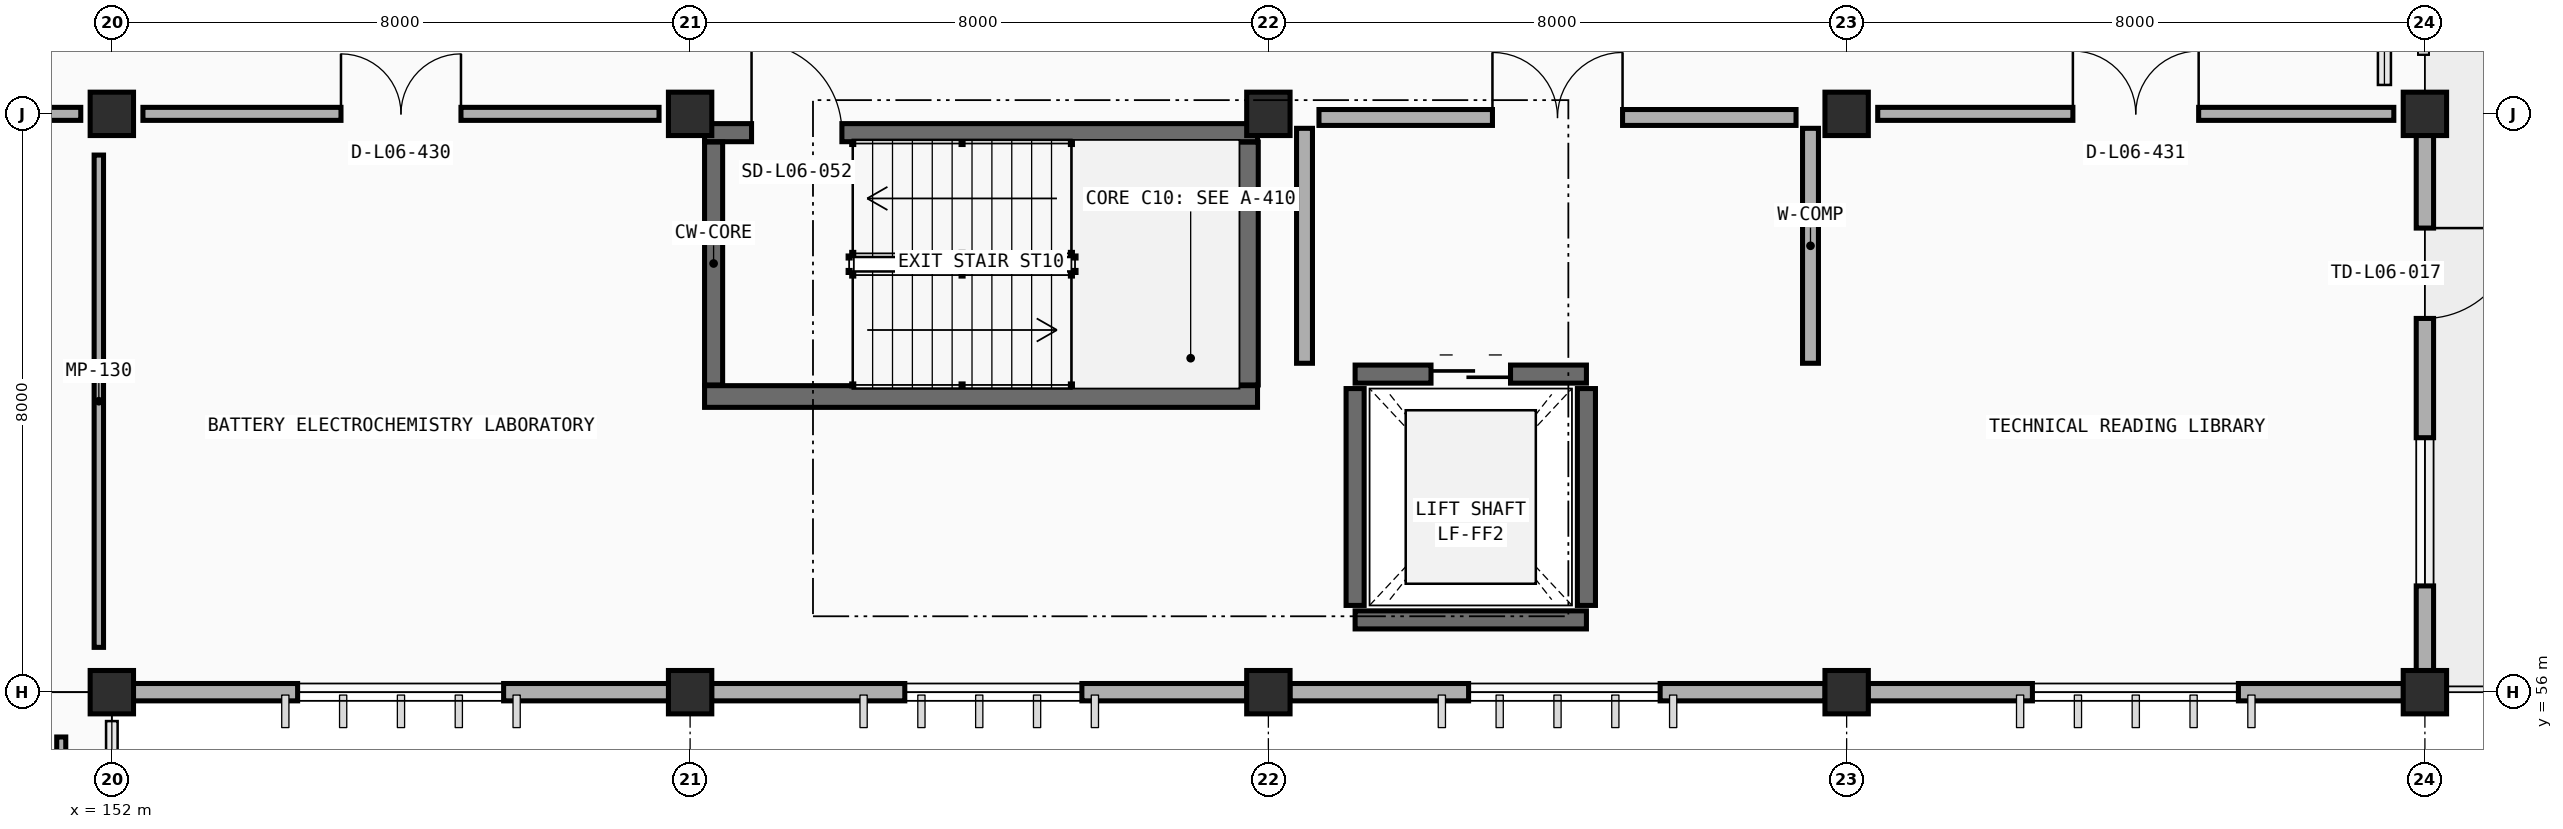
"""IFC4 building model, lengths in metres.
Left out: names, types, materials, properties, quantities, classifications, styles, units other than length and angle.
Written with IfcOpenShell. Run it as: python <this file> out.ifc"""

import sys

from ifc_helpers import new_model, si_unit, direction, frame, frame_2d, origin, origin_2d, place, context, subcontext, project, spatial, rectangle, extrude, element, fill, save


model = new_model("IFC4")
c1 = context("Model", 3, precision=1e-05, world=origin(), true_north=direction((0.0, 1.0)))
c2 = subcontext(c1, "Body", "Model", "MODEL_VIEW")
j1 = project(units=[si_unit("LENGTHUNIT", "METRE"), si_unit("PLANEANGLEUNIT", "RADIAN")], contexts=[c1])
p1 = place(None, origin())
s1 = spatial("IfcSite", under=j1, at=p1, CompositionType="ELEMENT")
p2 = place(p1, origin())
s2 = spatial("IfcBuilding", under=s1, at=p2, CompositionType="ELEMENT")
p3 = place(p2, frame((0.0, 0.0, 22.2)))
s3 = spatial("IfcBuildingStorey", under=s2, at=p3, CompositionType="ELEMENT", Elevation=22.2)
for number, where, z_axis, x_axis in (
    (1, (152.0, 56.0, 0.0), (0.0, 0.0, 1.0), (1.0, 0.0, 0.0)),
    (2, (160.0, 56.0, 0.0), (0.0, 0.0, 1.0), (1.0, 0.0, 0.0)),
    (3, (168.0, 56.0, 0.0), (0.0, 0.0, 1.0), (1.0, 0.0, 0.0)),
    (4, (176.0, 56.0, 0.0), (0.0, 0.0, 1.0), (1.0, 0.0, 0.0)),
    (5, (184.0, 56.0, 0.0), (0.0, 0.0, 1.0), (1.0, 0.0, 0.0)),
    (6, (152.0, 64.0, 0.0), (0.0, 0.0, 1.0), (1.0, 0.0, 0.0)),
    (7, (160.0, 64.0, 0.0), (0.0, 0.0, 1.0), (1.0, 0.0, 0.0)),
    (8, (168.0, 64.0, 0.0), (0.0, 0.0, 1.0), (1.0, 0.0, 0.0)),
    (9, (176.0, 64.0, 0.0), (0.0, 0.0, 1.0), (1.0, 0.0, 0.0)),
    (10, (184.0, 64.0, 0.0), (0.0, 0.0, 1.0), (1.0, 0.0, 0.0)),
):
    element("IfcColumn", number, at=place(p3, frame(where, z_axis=z_axis, x_axis=x_axis)), inside=s3, PredefinedType="COLUMN", context=c2, shape_type="SweptSolid", body=[
        extrude(rectangle(XDim=0.6, YDim=0.6, at=origin_2d()), origin(), (0.0, 0.0, 1.0), 4.2),
    ])
p4 = place(p3, frame((159.703, 56.0, 0.0), z_axis=(0.0, 0.0, 1.0), x_axis=(-1.0, 0.0, 0.0)))
e11 = element("IfcWall", 11, at=p4, inside=s3, PredefinedType="STANDARD", context=c2, shape_type="SweptSolid", body=[
    extrude(rectangle(XDim=7.406, YDim=0.24, at=frame_2d((3.703, 0.0))), origin(), (0.0, 0.0, 1.0), 3.335),
])
p5 = place(p4, frame((2.283, 0.0, 0.9)))
e12 = element("IfcOpeningElement", 12, at=p5, cuts=e11, PredefinedType="OPENING", context=c2, shape_type="SweptSolid", body=[
    extrude(rectangle(XDim=2.85, YDim=2.0, at=frame_2d((1.425, 1.0))), frame((0.0, 0.13, 0.0), z_axis=(0.0, -1.0, 0.0), x_axis=(1.0, 0.0, 0.0)), (0.0, 0.0, 1.0), 0.26),
])
p6 = place(p3, frame((167.703, 56.0, 0.0), z_axis=(0.0, 0.0, 1.0), x_axis=(-1.0, 0.0, 0.0)))
e13 = element("IfcWall", 13, at=p6, inside=s3, PredefinedType="STANDARD", context=c2, shape_type="SweptSolid", body=[
    extrude(rectangle(XDim=7.406, YDim=0.24, at=frame_2d((3.703, 0.0))), origin(), (0.0, 0.0, 1.0), 3.335),
])
p7 = place(p6, frame((2.283, 0.0, 0.9)))
e14 = element("IfcOpeningElement", 14, at=p7, cuts=e13, PredefinedType="OPENING", context=c2, shape_type="SweptSolid", body=[
    extrude(rectangle(XDim=2.45, YDim=2.0, at=frame_2d((1.225, 1.0))), frame((0.0, 0.13, 0.0), z_axis=(0.0, -1.0, 0.0), x_axis=(1.0, 0.0, 0.0)), (0.0, 0.0, 1.0), 0.26),
])
p8 = place(p3, frame((175.703, 56.0, 0.0), z_axis=(0.0, 0.0, 1.0), x_axis=(-1.0, 0.0, 0.0)))
e15 = element("IfcWall", 15, at=p8, inside=s3, PredefinedType="STANDARD", context=c2, shape_type="SweptSolid", body=[
    extrude(rectangle(XDim=7.406, YDim=0.24, at=frame_2d((3.703, 0.0))), origin(), (0.0, 0.0, 1.0), 3.335),
])
p9 = place(p8, frame((2.283, 0.0, 0.9)))
e16 = element("IfcOpeningElement", 16, at=p9, cuts=e15, PredefinedType="OPENING", context=c2, shape_type="SweptSolid", body=[
    extrude(rectangle(XDim=2.65, YDim=2.0, at=frame_2d((1.325, 1.0))), frame((0.0, 0.13, 0.0), z_axis=(0.0, -1.0, 0.0), x_axis=(1.0, 0.0, 0.0)), (0.0, 0.0, 1.0), 0.26),
])
p10 = place(p3, frame((183.703, 56.0, 0.0), z_axis=(0.0, 0.0, 1.0), x_axis=(-1.0, 0.0, 0.0)))
e17 = element("IfcWall", 17, at=p10, inside=s3, PredefinedType="STANDARD", context=c2, shape_type="SweptSolid", body=[
    extrude(rectangle(XDim=7.406, YDim=0.24, at=frame_2d((3.703, 0.0))), origin(), (0.0, 0.0, 1.0), 3.335),
])
p11 = place(p10, frame((2.283, 0.0, 0.9)))
e18 = element("IfcOpeningElement", 18, at=p11, cuts=e17, PredefinedType="OPENING", context=c2, shape_type="SweptSolid", body=[
    extrude(rectangle(XDim=2.85, YDim=2.0, at=frame_2d((1.425, 1.0))), frame((0.0, 0.13, 0.0), z_axis=(0.0, -1.0, 0.0), x_axis=(1.0, 0.0, 0.0)), (0.0, 0.0, 1.0), 0.26),
])
p12 = place(p3, frame((184.0, 63.703, 0.0), z_axis=(0.0, 0.0, 1.0), x_axis=(0.0, -1.0, 0.0)))
e19 = element("IfcWall", 19, at=p12, inside=s3, PredefinedType="STANDARD", context=c2, shape_type="SweptSolid", body=[
    extrude(rectangle(XDim=7.406, YDim=0.24, at=frame_2d((3.703, 0.0))), origin(), (0.0, 0.0, 1.0), 3.335),
])
p13 = place(p12, frame((1.283, 0.0, 0.0)))
e20 = element("IfcOpeningElement", 20, at=p13, cuts=e19, PredefinedType="OPENING", context=c2, shape_type="SweptSolid", body=[
    extrude(rectangle(XDim=1.25, YDim=2.2, at=frame_2d((0.625, 1.1))), frame((0.0, 0.13, 0.0), z_axis=(0.0, -1.0, 0.0), x_axis=(1.0, 0.0, 0.0)), (0.0, 0.0, 1.0), 0.26),
])
p14 = place(p12, frame((4.183, 0.0, 0.9)))
e21 = element("IfcOpeningElement", 21, at=p14, cuts=e19, PredefinedType="OPENING", context=c2, shape_type="SweptSolid", body=[
    extrude(rectangle(XDim=2.05, YDim=1.4, at=frame_2d((1.025, 0.7))), frame((0.0, 0.13, 0.0), z_axis=(0.0, -1.0, 0.0), x_axis=(1.0, 0.0, 0.0)), (0.0, 0.0, 1.0), 0.26),
])
p15 = place(p3, frame((183.76, 64.22, 0.0), z_axis=(0.0, 0.0, 1.0), x_axis=(-1.0, 0.0, 0.0)))
e22 = element("IfcWall", 22, at=p15, inside=s3, PredefinedType="PARAPET", context=c2, shape_type="SweptSolid", body=[
    extrude(rectangle(XDim=0.32, YDim=0.2, at=frame_2d((0.16, 0.0))), origin(), (0.0, 0.0, 1.0), 3.35),
])
p16 = place(p3, frame((160.2, 60.09, 0.0), z_axis=(0.0, 0.0, 1.0), x_axis=(1.0, 0.0, 0.0)))
e23 = element("IfcWall", 23, at=p16, inside=s3, PredefinedType="SHEAR", context=c2, shape_type="SweptSolid", body=[
    extrude(rectangle(XDim=7.65, YDim=0.3, at=frame_2d((3.825, 0.0))), origin(), (0.0, 0.0, 1.0), 4.2),
])
p17 = place(p3, frame((167.71, 60.25, 0.0), z_axis=(0.0, 0.0, 1.0), x_axis=(0.0, 1.0, 0.0)))
e24 = element("IfcWall", 24, at=p17, inside=s3, PredefinedType="SHEAR", context=c2, shape_type="SweptSolid", body=[
    extrude(rectangle(XDim=3.36, YDim=0.3, at=frame_2d((1.68, 0.0))), origin(), (0.0, 0.0, 1.0), 4.2),
])
p18 = place(p3, frame((160.2, 63.74, 0.0), z_axis=(0.0, 0.0, 1.0), x_axis=(1.0, 0.0, 0.0)))
e25 = element("IfcWall", 25, at=p18, inside=s3, PredefinedType="SOLIDWALL", context=c2, shape_type="SweptSolid", body=[
    extrude(rectangle(XDim=7.65, YDim=0.25, at=frame_2d((3.825, 0.0))), origin(), (0.0, 0.0, 1.0), 4.2),
])
p19 = place(p18, frame((0.65, 0.0, 0.0)))
e26 = element("IfcOpeningElement", 26, at=p19, cuts=e25, PredefinedType="OPENING", context=c2, shape_type="SweptSolid", body=[
    extrude(rectangle(XDim=1.25, YDim=2.15, at=frame_2d((0.625, 1.075))), frame((0.0, 0.135, 0.0), z_axis=(0.0, -1.0, 0.0), x_axis=(1.0, 0.0, 0.0)), (0.0, 0.0, 1.0), 0.27),
])
p20 = place(p3, frame((160.325, 60.25, 0.0), z_axis=(0.0, 0.0, 1.0), x_axis=(0.0, 1.0, 0.0)))
e27 = element("IfcWall", 27, at=p20, inside=s3, PredefinedType="SOLIDWALL", context=c2, shape_type="SweptSolid", body=[
    extrude(rectangle(XDim=3.36, YDim=0.25, at=frame_2d((1.68, 0.0))), origin(), (0.0, 0.0, 1.0), 4.2),
])
p21 = place(p3, frame((169.2, 57.0, 0.0), z_axis=(0.0, 0.0, 1.0), x_axis=(1.0, 0.0, 0.0)))
e28 = element("IfcWall", 28, at=p21, inside=s3, PredefinedType="SOLIDWALL", context=c2, shape_type="SweptSolid", body=[
    extrude(rectangle(XDim=3.2, YDim=0.25, at=frame_2d((1.6, 0.0))), origin(), (0.0, 0.0, 1.0), 4.2),
])
p22 = place(p3, frame((169.2, 60.4, 0.0), z_axis=(0.0, 0.0, 1.0), x_axis=(1.0, 0.0, 0.0)))
e29 = element("IfcWall", 29, at=p22, inside=s3, PredefinedType="SOLIDWALL", context=c2, shape_type="SweptSolid", body=[
    extrude(rectangle(XDim=3.2, YDim=0.25, at=frame_2d((1.6, 0.0))), origin(), (0.0, 0.0, 1.0), 4.2),
])
p23 = place(p22, frame((1.05, 0.0, 0.0)))
e30 = element("IfcOpeningElement", 30, at=p23, cuts=e29, PredefinedType="OPENING", context=c2, shape_type="SweptSolid", body=[
    extrude(rectangle(XDim=1.1, YDim=2.15, at=frame_2d((0.55, 1.075))), frame((0.0, 0.135, 0.0), z_axis=(0.0, -1.0, 0.0), x_axis=(1.0, 0.0, 0.0)), (0.0, 0.0, 1.0), 0.27),
])
for number, where, z_axis, x_axis in (
    (31, (169.2, 57.2, 0.0), (0.0, 0.0, 1.0), (0.0, 1.0, 0.0)),
    (32, (172.4, 57.2, 0.0), (0.0, 0.0, 1.0), (0.0, 1.0, 0.0)),
):
    element("IfcWall", number, at=place(p3, frame(where, z_axis=z_axis, x_axis=x_axis)), inside=s3, PredefinedType="SOLIDWALL", context=c2, shape_type="SweptSolid", body=[
        extrude(rectangle(XDim=3.0, YDim=0.25, at=frame_2d((1.5, 0.0))), origin(), (0.0, 0.0, 1.0), 4.2),
    ])
p24 = place(p3, frame((168.7, 63.95, 0.0), z_axis=(0.0, 0.0, 1.0), x_axis=(1.0, 0.0, 0.0)))
e33 = element("IfcWall", 33, at=p24, inside=s3, PredefinedType="PARTITIONING", context=c2, shape_type="SweptSolid", body=[
    extrude(rectangle(XDim=6.6, YDim=0.22, at=frame_2d((3.3, 0.0))), origin(), (0.0, 0.0, 1.0), 3.3),
])
p25 = place(p24, frame((2.4, 0.0, 0.0)))
e34 = element("IfcOpeningElement", 34, at=p25, cuts=e33, PredefinedType="OPENING", context=c2, shape_type="SweptSolid", body=[
    extrude(rectangle(XDim=1.8, YDim=2.2, at=frame_2d((0.9, 1.1))), frame((0.0, 0.12, 0.0), z_axis=(0.0, -1.0, 0.0), x_axis=(1.0, 0.0, 0.0)), (0.0, 0.0, 1.0), 0.24),
])
for number, where, z_axis, x_axis in (
    (35, (168.5, 60.55, 0.0), (0.0, 0.0, 1.0), (0.0, 1.0, 0.0)),
    (36, (175.5, 60.55, 0.0), (0.0, 0.0, 1.0), (0.0, 1.0, 0.0)),
):
    element("IfcWall", number, at=place(p3, frame(where, z_axis=z_axis, x_axis=x_axis)), inside=s3, PredefinedType="PARTITIONING", context=c2, shape_type="SweptSolid", body=[
        extrude(rectangle(XDim=3.25, YDim=0.22, at=frame_2d((1.625, 0.0))), origin(), (0.0, 0.0, 1.0), 3.3),
    ])
p26 = place(p3, frame((136.43, 64.0, 0.0), z_axis=(0.0, 0.0, 1.0), x_axis=(1.0, 0.0, 0.0)))
e37 = element("IfcWall", 37, at=p26, inside=s3, PredefinedType="PARTITIONING", context=c2, shape_type="SweptSolid", body=[
    extrude(rectangle(XDim=15.14, YDim=0.18, at=frame_2d((7.57, 0.0))), origin(), (0.0, 0.0, 1.0), 3.3),
])
p27 = place(p26, frame((2.93, 0.0, 0.0)))
e38 = element("IfcOpeningElement", 38, at=p27, cuts=e37, PredefinedType="OPENING", context=c2, shape_type="SweptSolid", body=[
    extrude(rectangle(XDim=1.28, YDim=2.2, at=frame_2d((0.64, 1.1))), frame((0.0, 0.1, 0.0), z_axis=(0.0, -1.0, 0.0), x_axis=(1.0, 0.0, 0.0)), (0.0, 0.0, 1.0), 0.2),
])
p28 = place(p3, frame((151.82, 56.62, 0.0), z_axis=(0.0, 0.0, 1.0), x_axis=(0.0, 1.0, 0.0)))
e39 = element("IfcWall", 39, at=p28, inside=s3, PredefinedType="MOVABLE", context=c2, shape_type="SweptSolid", body=[
    extrude(rectangle(XDim=6.81, YDim=0.13, at=frame_2d((3.405, 0.0))), origin(), (0.0, 0.0, 1.0), 3.3),
])
p29 = place(p3, frame((152.43, 64.0, 0.0), z_axis=(0.0, 0.0, 1.0), x_axis=(1.0, 0.0, 0.0)))
e40 = element("IfcWall", 40, at=p29, inside=s3, PredefinedType="PARTITIONING", context=c2, shape_type="SweptSolid", body=[
    extrude(rectangle(XDim=7.14, YDim=0.18, at=frame_2d((3.57, 0.0))), origin(), (0.0, 0.0, 1.0), 3.3),
])
p30 = place(p29, frame((2.74, 0.0, 0.0)))
e41 = element("IfcOpeningElement", 41, at=p30, cuts=e40, PredefinedType="OPENING", context=c2, shape_type="SweptSolid", body=[
    extrude(rectangle(XDim=1.66, YDim=2.22, at=frame_2d((0.83, 1.11))), frame((0.0, 0.1, 0.0), z_axis=(0.0, -1.0, 0.0), x_axis=(1.0, 0.0, 0.0)), (0.0, 0.0, 1.0), 0.2),
])
p31 = place(p3, frame((176.43, 64.0, 0.0), z_axis=(0.0, 0.0, 1.0), x_axis=(1.0, 0.0, 0.0)))
e42 = element("IfcWall", 42, at=p31, inside=s3, PredefinedType="PARTITIONING", context=c2, shape_type="SweptSolid", body=[
    extrude(rectangle(XDim=7.14, YDim=0.18, at=frame_2d((3.57, 0.0))), origin(), (0.0, 0.0, 1.0), 3.3),
])
p32 = place(p31, frame((2.7, 0.0, 0.0)))
e43 = element("IfcOpeningElement", 43, at=p32, cuts=e42, PredefinedType="OPENING", context=c2, shape_type="SweptSolid", body=[
    extrude(rectangle(XDim=1.74, YDim=2.22, at=frame_2d((0.87, 1.11))), frame((0.0, 0.1, 0.0), z_axis=(0.0, -1.0, 0.0), x_axis=(1.0, 0.0, 0.0)), (0.0, 0.0, 1.0), 0.2),
])
p33 = place(p3, frame((151.3, 50.47, 0.0), z_axis=(0.0, 0.0, 1.0), x_axis=(0.0, 1.0, 0.0)))
e44 = element("IfcWall", 44, at=p33, inside=s3, PredefinedType="PARTITIONING", context=c2, shape_type="SweptSolid", body=[
    extrude(rectangle(XDim=4.91, YDim=0.125, at=frame_2d((2.455, 0.0))), origin(), (0.0, 0.0, 1.0), 3.3),
])
p34 = place(p5, origin())
e45 = element("IfcWindow", 45, at=p34, inside=s3, PartitioningType="DOUBLE_PANEL_VERTICAL", PredefinedType="WINDOW", context=c2, shape_type="SweptSolid", body=[
    extrude(rectangle(XDim=2.85, YDim=2.0, at=frame_2d((1.425, 1.0))), frame((0.0, 0.03, 0.0), z_axis=(0.0, -1.0, 0.0), x_axis=(1.0, 0.0, 0.0)), (0.0, 0.0, 1.0), 0.06),
])
fill(e12, e45)
p35 = place(p7, origin())
e46 = element("IfcWindow", 46, at=p35, inside=s3, PartitioningType="DOUBLE_PANEL_VERTICAL", PredefinedType="WINDOW", context=c2, shape_type="SweptSolid", body=[
    extrude(rectangle(XDim=2.45, YDim=2.0, at=frame_2d((1.225, 1.0))), frame((0.0, 0.03, 0.0), z_axis=(0.0, -1.0, 0.0), x_axis=(1.0, 0.0, 0.0)), (0.0, 0.0, 1.0), 0.06),
])
fill(e14, e46)
p36 = place(p9, origin())
e47 = element("IfcWindow", 47, at=p36, inside=s3, PartitioningType="DOUBLE_PANEL_VERTICAL", PredefinedType="WINDOW", context=c2, shape_type="SweptSolid", body=[
    extrude(rectangle(XDim=2.65, YDim=2.0, at=frame_2d((1.325, 1.0))), frame((0.0, 0.03, 0.0), z_axis=(0.0, -1.0, 0.0), x_axis=(1.0, 0.0, 0.0)), (0.0, 0.0, 1.0), 0.06),
])
fill(e16, e47)
p37 = place(p11, origin())
e48 = element("IfcWindow", 48, at=p37, inside=s3, PartitioningType="DOUBLE_PANEL_VERTICAL", PredefinedType="WINDOW", context=c2, shape_type="SweptSolid", body=[
    extrude(rectangle(XDim=2.85, YDim=2.0, at=frame_2d((1.425, 1.0))), frame((0.0, 0.03, 0.0), z_axis=(0.0, -1.0, 0.0), x_axis=(1.0, 0.0, 0.0)), (0.0, 0.0, 1.0), 0.06),
])
fill(e18, e48)
p38 = place(p13, origin())
e49 = element("IfcDoor", 49, at=p38, inside=s3, OperationType="SINGLE_SWING_LEFT", PredefinedType="DOOR", context=c2, shape_type="SweptSolid", body=[
    extrude(rectangle(XDim=1.25, YDim=2.2, at=frame_2d((0.625, 1.1))), frame((0.0, 0.025, 0.0), z_axis=(0.0, -1.0, 0.0), x_axis=(1.0, 0.0, 0.0)), (0.0, 0.0, 1.0), 0.05),
])
fill(e20, e49)
p39 = place(p14, origin())
e50 = element("IfcWindow", 50, at=p39, inside=s3, PartitioningType="DOUBLE_PANEL_VERTICAL", PredefinedType="WINDOW", context=c2, shape_type="SweptSolid", body=[
    extrude(rectangle(XDim=2.05, YDim=1.4, at=frame_2d((1.025, 0.7))), frame((0.0, 0.03, 0.0), z_axis=(0.0, -1.0, 0.0), x_axis=(1.0, 0.0, 0.0)), (0.0, 0.0, 1.0), 0.06),
])
fill(e21, e50)
p40 = place(p19, origin())
e51 = element("IfcDoor", 51, at=p40, inside=s3, OperationType="SINGLE_SWING_LEFT", PredefinedType="DOOR", context=c2, shape_type="SweptSolid", body=[
    extrude(rectangle(XDim=1.25, YDim=2.15, at=frame_2d((0.625, 1.075))), frame((0.0, 0.025, 0.0), z_axis=(0.0, -1.0, 0.0), x_axis=(1.0, 0.0, 0.0)), (0.0, 0.0, 1.0), 0.05),
])
fill(e26, e51)
p41 = place(p23, origin())
e52 = element("IfcDoor", 52, at=p41, inside=s3, OperationType="DOUBLE_DOOR_SLIDING", PredefinedType="DOOR", context=c2, shape_type="SweptSolid", body=[
    extrude(rectangle(XDim=1.1, YDim=2.15, at=frame_2d((0.55, 1.075))), frame((0.0, 0.025, 0.0), z_axis=(0.0, -1.0, 0.0), x_axis=(1.0, 0.0, 0.0)), (0.0, 0.0, 1.0), 0.05),
])
fill(e30, e52)
p42 = place(p25, origin())
e53 = element("IfcDoor", 53, at=p42, inside=s3, OperationType="DOUBLE_DOOR_SINGLE_SWING", PredefinedType="DOOR", context=c2, shape_type="SweptSolid", body=[
    extrude(rectangle(XDim=1.8, YDim=2.2, at=frame_2d((0.9, 1.1))), frame((0.0, 0.025, 0.0), z_axis=(0.0, -1.0, 0.0), x_axis=(1.0, 0.0, 0.0)), (0.0, 0.0, 1.0), 0.05),
])
fill(e34, e53)
p43 = place(p30, origin())
e54 = element("IfcDoor", 54, at=p43, inside=s3, OperationType="DOUBLE_DOOR_SINGLE_SWING", PredefinedType="DOOR", context=c2, shape_type="SweptSolid", body=[
    extrude(rectangle(XDim=1.66, YDim=2.22, at=frame_2d((0.83, 1.11))), frame((0.0, 0.025, 0.0), z_axis=(0.0, -1.0, 0.0), x_axis=(1.0, 0.0, 0.0)), (0.0, 0.0, 1.0), 0.05),
])
fill(e41, e54)
p44 = place(p32, origin())
e55 = element("IfcDoor", 55, at=p44, inside=s3, OperationType="DOUBLE_DOOR_SINGLE_SWING", PredefinedType="DOOR", context=c2, shape_type="SweptSolid", body=[
    extrude(rectangle(XDim=1.74, YDim=2.22, at=frame_2d((0.87, 1.11))), frame((0.0, 0.025, 0.0), z_axis=(0.0, -1.0, 0.0), x_axis=(1.0, 0.0, 0.0)), (0.0, 0.0, 1.0), 0.05),
])
fill(e43, e55)
save(model, sys.argv[1])
